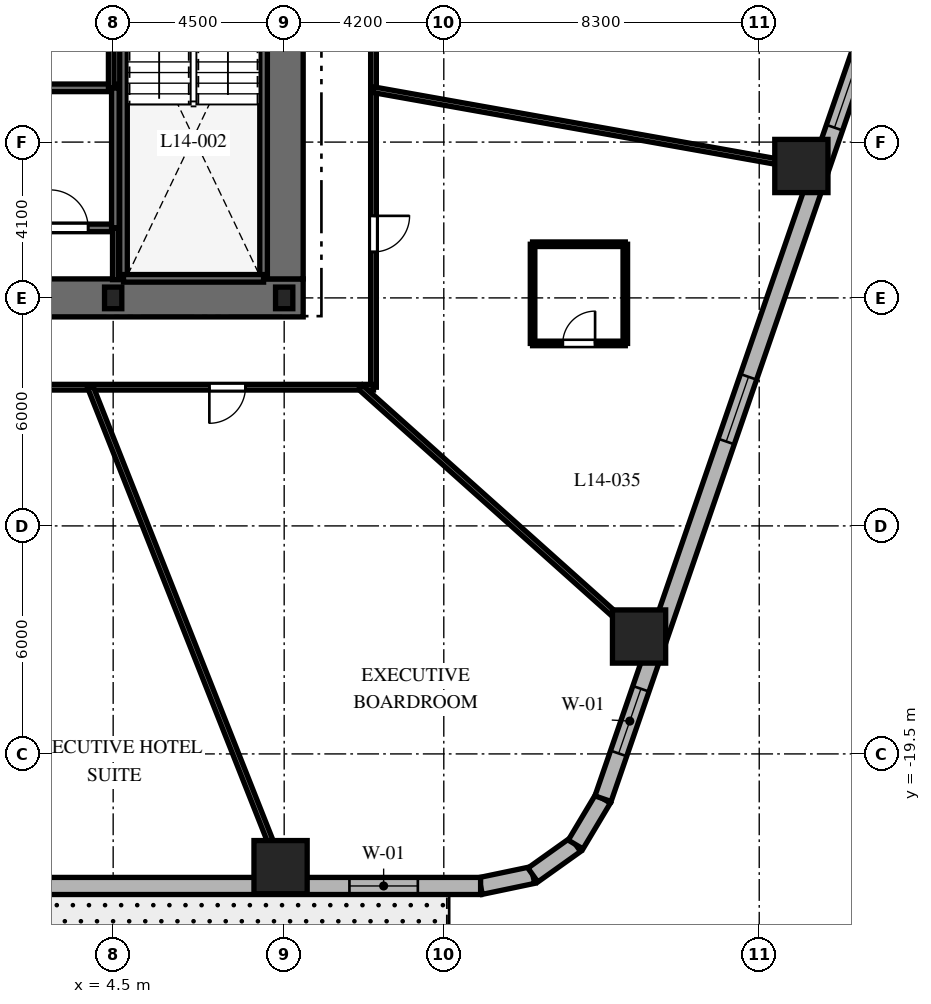
"""IFC4 building model, lengths in metres.
Left out: names, types, materials, properties, quantities, classifications, styles, units other than length and angle.
Written with IfcOpenShell. Run it as: python <this file> out.ifc"""

import sys

from ifc_helpers import new_model, si_unit, direction, frame, frame_2d, origin, origin_2d, place, context, subcontext, project, spatial, rectangle, i_section, extrude, element, fill, save


model = new_model("IFC4")
c1 = context("Model", 3, precision=1e-05, world=origin(), true_north=direction((0.0, 1.0)))
c2 = subcontext(c1, "Body", "Model", "MODEL_VIEW")
j1 = project(units=[si_unit("LENGTHUNIT", "METRE"), si_unit("PLANEANGLEUNIT", "RADIAN")], contexts=[c1])
p1 = place(None, origin())
s1 = spatial("IfcSite", under=j1, at=p1, CompositionType="ELEMENT")
p2 = place(p1, origin())
s2 = spatial("IfcBuilding", under=s1, at=p2, CompositionType="ELEMENT")
p3 = place(p2, frame((0.0, 0.0, 63.8)))
s3 = spatial("IfcBuildingStorey", under=s2, at=p3, CompositionType="ELEMENT", Elevation=63.8)
p4 = place(p3, frame((-9.5, -7.5, 0.0), z_axis=(0.0, 0.0, 1.0), x_axis=(1.0, 0.0, 0.0)))
e1 = element("IfcWall", 1, at=p4, inside=s3, PredefinedType="SHEAR", context=c2, shape_type="SweptSolid", body=[
    extrude(rectangle(XDim=19.0, YDim=1.0, at=frame_2d((9.5, 0.0))), origin(), (0.0, 0.0, 1.0), 3.7),
])
p5 = place(p4, frame((9.55, 0.0, 0.0)))
e2 = element("IfcOpeningElement", 2, at=p5, cuts=e1, PredefinedType="OPENING", context=c2, shape_type="SweptSolid", body=[
    extrude(rectangle(XDim=1.0, YDim=2.15, at=frame_2d((0.5, 1.075))), frame((0.0, 0.51, 0.0), z_axis=(0.0, -1.0, 0.0), x_axis=(1.0, 0.0, 0.0)), (0.0, 0.0, 1.0), 1.02),
])
p6 = place(p3, frame((9.0, -7.0, 0.0), z_axis=(0.0, 0.0, 1.0), x_axis=(0.0, 1.0, 0.0)))
e3 = element("IfcWall", 3, at=p6, inside=s3, PredefinedType="SHEAR", context=c2, shape_type="SweptSolid", body=[
    extrude(rectangle(XDim=14.0, YDim=1.0, at=frame_2d((7.0, 0.0))), origin(), (0.0, 0.0, 1.0), 3.7),
])
p7 = place(p6, frame((10.125, 0.0, 0.0)))
e4 = element("IfcOpeningElement", 4, at=p7, cuts=e3, PredefinedType="OPENING", context=c2, shape_type="SweptSolid", body=[
    extrude(rectangle(XDim=1.05, YDim=2.15, at=frame_2d((0.525, 1.075))), frame((0.0, 0.51, 0.0), z_axis=(0.0, -1.0, 0.0), x_axis=(1.0, 0.0, 0.0)), (0.0, 0.0, 1.0), 1.02),
])
for number, where, z_axis, x_axis in (
    (5, (4.772, -6.985, 0.0), (0.0, 0.0, 1.0), (0.0, 1.0, 0.0)),
    (6, (8.458, -6.985, 0.0), (0.0, 0.0, 1.0), (0.0, 1.0, 0.0)),
):
    element("IfcWall", number, at=place(p3, frame(where, z_axis=z_axis, x_axis=x_axis)), inside=s3, PredefinedType="SHEAR", context=c2, shape_type="SweptSolid", body=[
        extrude(rectangle(XDim=9.143, YDim=0.2, at=frame_2d((4.572, 0.0))), origin(), (0.0, 0.0, 1.0), 3.7),
    ])
p8 = place(p3, frame((4.772, -6.985, 0.0), z_axis=(0.0, 0.0, 1.0), x_axis=(1.0, 0.0, 0.0)))
e7 = element("IfcWall", 7, at=p8, inside=s3, PredefinedType="SHEAR", context=c2, shape_type="SweptSolid", body=[
    extrude(rectangle(XDim=3.686, YDim=0.2, at=frame_2d((1.843, 0.0))), origin(), (0.0, 0.0, 1.0), 3.7),
])
p9 = place(p3, frame((-4.608, -5.658, 0.0), z_axis=(0.0, 0.0, 1.0), x_axis=(1.0, 0.0, 0.0)))
e8 = element("IfcWall", 8, at=p9, inside=s3, PredefinedType="SHEAR", context=c2, shape_type="SweptSolid", body=[
    extrude(rectangle(XDim=9.166, YDim=0.2, at=frame_2d((4.583, 0.0))), origin(), (0.0, 0.0, 1.0), 3.7),
])
p10 = place(p9, frame((7.45, 0.0, 0.0)))
e9 = element("IfcOpeningElement", 9, at=p10, cuts=e8, PredefinedType="OPENING", context=c2, shape_type="SweptSolid", body=[
    extrude(rectangle(XDim=1.0, YDim=2.15, at=frame_2d((0.5, 1.075))), frame((0.0, 0.11, 0.0), z_axis=(0.0, -1.0, 0.0), x_axis=(1.0, 0.0, 0.0)), (0.0, 0.0, 1.0), 0.22),
])
p11 = place(p3, frame((-4.608, -1.972, 0.0), z_axis=(0.0, 0.0, 1.0), x_axis=(1.0, 0.0, 0.0)))
e10 = element("IfcWall", 10, at=p11, inside=s3, PredefinedType="SHEAR", context=c2, shape_type="SweptSolid", body=[
    extrude(rectangle(XDim=9.166, YDim=0.2, at=frame_2d((4.583, 0.0))), origin(), (0.0, 0.0, 1.0), 3.7),
])
p12 = place(p3, frame((4.558, -5.658, 0.0), z_axis=(0.0, 0.0, 1.0), x_axis=(0.0, 1.0, 0.0)))
e11 = element("IfcWall", 11, at=p12, inside=s3, PredefinedType="SHEAR", context=c2, shape_type="SweptSolid", body=[
    extrude(rectangle(XDim=3.686, YDim=0.2, at=frame_2d((1.843, 0.0))), origin(), (0.0, 0.0, 1.0), 3.7),
])
for number, where, z_axis, x_axis in (
    (12, (4.5, -7.5, 0.0), (0.0, 0.0, 1.0), (1.0, 0.0, 0.0)),
    (13, (9.0, -7.5, 0.0), (0.0, 0.0, 1.0), (1.0, 0.0, 0.0)),
):
    element("IfcColumn", number, at=place(p3, frame(where, z_axis=z_axis, x_axis=x_axis)), inside=s3, PredefinedType="COLUMN", context=c2, shape_type="SweptSolid", body=[
        extrude(i_section(OverallWidth=0.454, OverallDepth=0.569, WebThickness=0.078, FlangeThickness=0.125, at=origin_2d()), origin(), (0.0, 0.0, 1.0), 3.7),
    ])
for number, where, z_axis, x_axis in (
    (14, (8.905, -22.48, 0.0), (0.0, 0.0, 1.0), (1.0, 0.0, 0.0)),
    (15, (18.338, -16.411, 0.0), (0.0, 0.0, 1.0), (1.0, 0.0, 0.0)),
    (16, (22.609, -4.029, 0.0), (0.0, 0.0, 1.0), (1.0, 0.0, 0.0)),
):
    element("IfcColumn", number, at=place(p3, frame(where, z_axis=z_axis, x_axis=x_axis)), inside=s3, PredefinedType="COLUMN", context=c2, shape_type="SweptSolid", body=[
        extrude(rectangle(XDim=1.4, YDim=1.4, at=origin_2d()), origin(), (0.0, 0.0, 1.0), 3.7),
    ])
p13 = place(p3, frame((14.168, -22.975, 0.0), z_axis=(0.0, 0.0, 1.0), x_axis=(0.978770371074, 0.204959900243, 0.0)))
e17 = element("IfcWall", 17, at=p13, inside=s3, PredefinedType="SOLIDWALL", context=c2, shape_type="SweptSolid", body=[
    extrude(rectangle(XDim=1.406, YDim=0.45, at=frame_2d((0.703, 0.0))), origin(), (0.0, 0.0, 1.0), 3.4),
])
p14 = place(p3, frame((15.544, -22.687, 0.0), z_axis=(0.0, 0.0, 1.0), x_axis=(0.814210854316, 0.580569276412, 0.0)))
e18 = element("IfcWall", 18, at=p14, inside=s3, PredefinedType="SOLIDWALL", context=c2, shape_type="SweptSolid", body=[
    extrude(rectangle(XDim=1.381, YDim=0.45, at=frame_2d((0.691, 0.0))), origin(), (0.0, 0.0, 1.0), 3.4),
])
p15 = place(p3, frame((16.669, -21.885, 0.0), z_axis=(0.0, 0.0, 1.0), x_axis=(0.512936712947, 0.858426425799, 0.0)))
e19 = element("IfcWall", 19, at=p15, inside=s3, PredefinedType="SOLIDWALL", context=c2, shape_type="SweptSolid", body=[
    extrude(rectangle(XDim=1.406, YDim=0.45, at=frame_2d((0.703, 0.0))), origin(), (0.0, 0.0, 1.0), 3.4),
])
p16 = place(p3, frame((-12.221, -22.975, 0.0), z_axis=(0.0, 0.0, 1.0), x_axis=(1.0, 0.0, 0.0)))
e20 = element("IfcWall", 20, at=p16, inside=s3, PredefinedType="SOLIDWALL", context=c2, shape_type="SweptSolid", body=[
    extrude(rectangle(XDim=26.389, YDim=0.45, at=frame_2d((13.195, 0.0))), origin(), (0.0, 0.0, 1.0), 3.4),
])
p17 = place(p16, frame((2.799, 0.0, 0.0)))
e21 = element("IfcOpeningElement", 21, at=p17, cuts=e20, PredefinedType="OPENING", context=c2, shape_type="SweptSolid", body=[
    extrude(rectangle(XDim=1.0, YDim=2.15, at=frame_2d((0.5, 1.075))), frame((0.0, 0.235, 0.0), z_axis=(0.0, -1.0, 0.0), x_axis=(1.0, 0.0, 0.0)), (0.0, 0.0, 1.0), 0.47),
])
p18 = place(p16, frame((12.296, 0.0, 0.8)))
e22 = element("IfcOpeningElement", 22, at=p18, cuts=e20, PredefinedType="OPENING", context=c2, shape_type="SweptSolid", body=[
    extrude(rectangle(XDim=1.8, YDim=1.8, at=frame_2d((0.9, 0.9))), frame((0.0, 0.235, 0.0), z_axis=(0.0, -1.0, 0.0), x_axis=(1.0, 0.0, 0.0)), (0.0, 0.0, 1.0), 0.47),
])
p19 = place(p16, frame((22.938, 0.0, 0.8)))
e23 = element("IfcOpeningElement", 23, at=p19, cuts=e20, PredefinedType="OPENING", context=c2, shape_type="SweptSolid", body=[
    extrude(rectangle(XDim=1.8, YDim=1.8, at=frame_2d((0.9, 0.9))), frame((0.0, 0.235, 0.0), z_axis=(0.0, -1.0, 0.0), x_axis=(1.0, 0.0, 0.0)), (0.0, 0.0, 1.0), 0.47),
])
p20 = place(p3, frame((17.39, -20.678, 0.0), z_axis=(0.0, 0.0, 1.0), x_axis=(0.326068018294, 0.945346310854, 0.0)))
e24 = element("IfcWall", 24, at=p20, inside=s3, PredefinedType="SOLIDWALL", context=c2, shape_type="SweptSolid", body=[
    extrude(rectangle(XDim=21.793, YDim=0.45, at=frame_2d((10.896, 0.0))), origin(), (0.0, 0.0, 1.0), 3.4),
])
p21 = place(p20, frame((1.26, 0.0, 0.8)))
e25 = element("IfcOpeningElement", 25, at=p21, cuts=e24, PredefinedType="OPENING", context=c2, shape_type="SweptSolid", body=[
    extrude(rectangle(XDim=1.8, YDim=1.8, at=frame_2d((0.9, 0.9))), frame((0.0, 0.235, 0.0), z_axis=(0.0, -1.0, 0.0), x_axis=(1.0, 0.0, 0.0)), (0.0, 0.0, 1.0), 0.47),
])
p22 = place(p20, frame((9.943, 0.0, 0.8)))
e26 = element("IfcOpeningElement", 26, at=p22, cuts=e24, PredefinedType="OPENING", context=c2, shape_type="SweptSolid", body=[
    extrude(rectangle(XDim=1.8, YDim=1.8, at=frame_2d((0.9, 0.9))), frame((0.0, 0.235, 0.0), z_axis=(0.0, -1.0, 0.0), x_axis=(1.0, 0.0, 0.0)), (0.0, 0.0, 1.0), 0.47),
])
p23 = place(p20, frame((18.68, 0.0, 0.8)))
e27 = element("IfcOpeningElement", 27, at=p23, cuts=e24, PredefinedType="OPENING", context=c2, shape_type="SweptSolid", body=[
    extrude(rectangle(XDim=1.8, YDim=1.8, at=frame_2d((0.9, 0.9))), frame((0.0, 0.235, 0.0), z_axis=(0.0, -1.0, 0.0), x_axis=(1.0, 0.0, 0.0)), (0.0, 0.0, 1.0), 0.47),
])
p24 = place(p3, frame((4.558, -7.02, 0.0), z_axis=(0.0, 0.0, 1.0), x_axis=(0.0, 1.0, 0.0)))
e28 = element("IfcWall", 28, at=p24, inside=s3, PredefinedType="PARTITIONING", context=c2, shape_type="SweptSolid", body=[
    extrude(rectangle(XDim=1.362, YDim=0.15, at=frame_2d((0.681, 0.0))), origin(), (0.0, 0.0, 1.0), 3.4),
])
p25 = place(p3, frame((4.45, -1.972, 0.0), z_axis=(0.0, 0.0, 1.0), x_axis=(0.0, 1.0, 0.0)))
e29 = element("IfcWall", 29, at=p25, inside=s3, PredefinedType="PARTITIONING", context=c2, shape_type="SweptSolid", body=[
    extrude(rectangle(XDim=4.222, YDim=0.15, at=frame_2d((2.111, 0.0))), origin(), (0.0, 0.0, 1.0), 3.4),
])
p26 = place(p3, frame((11.35, 9.85, 0.0), z_axis=(0.0, 0.0, 1.0), x_axis=(0.0, -1.0, 0.0)))
e30 = element("IfcWall", 30, at=p26, inside=s3, PredefinedType="PARTITIONING", context=c2, shape_type="SweptSolid", body=[
    extrude(rectangle(XDim=19.7, YDim=0.15, at=frame_2d((9.85, 0.0))), origin(), (0.0, 0.0, 1.0), 2.84),
])
p27 = place(p26, frame((4.704, 0.0, 0.0)))
e31 = element("IfcOpeningElement", 31, at=p27, cuts=e30, PredefinedType="OPENING", context=c2, shape_type="SweptSolid", body=[
    extrude(rectangle(XDim=0.95, YDim=2.03, at=frame_2d((0.475, 1.015))), frame((0.0, 0.085, 0.0), z_axis=(0.0, -1.0, 0.0), x_axis=(1.0, 0.0, 0.0)), (0.0, 0.0, 1.0), 0.17),
])
p28 = place(p26, frame((1.462, 0.0, 0.0)))
e32 = element("IfcOpeningElement", 32, at=p28, cuts=e30, PredefinedType="OPENING", context=c2, shape_type="SweptSolid", body=[
    extrude(rectangle(XDim=0.95, YDim=2.03, at=frame_2d((0.475, 1.015))), frame((0.0, 0.085, 0.0), z_axis=(0.0, -1.0, 0.0), x_axis=(1.0, 0.0, 0.0)), (0.0, 0.0, 1.0), 0.17),
])
p29 = place(p26, frame((15.191, 0.0, 0.0)))
e33 = element("IfcOpeningElement", 33, at=p29, cuts=e30, PredefinedType="OPENING", context=c2, shape_type="SweptSolid", body=[
    extrude(rectangle(XDim=0.95, YDim=2.03, at=frame_2d((0.475, 1.015))), frame((0.0, 0.085, 0.0), z_axis=(0.0, -1.0, 0.0), x_axis=(1.0, 0.0, 0.0)), (0.0, 0.0, 1.0), 0.17),
])
p30 = place(p26, frame((8.838, 0.0, 0.0)))
e34 = element("IfcOpeningElement", 34, at=p30, cuts=e30, PredefinedType="OPENING", context=c2, shape_type="SweptSolid", body=[
    extrude(rectangle(XDim=0.95, YDim=2.03, at=frame_2d((0.475, 1.015))), frame((0.0, 0.085, 0.0), z_axis=(0.0, -1.0, 0.0), x_axis=(1.0, 0.0, 0.0)), (0.0, 0.0, 1.0), 0.17),
])
p31 = place(p3, frame((11.35, -9.85, 0.0), z_axis=(0.0, 0.0, 1.0), x_axis=(-1.0, 0.0, 0.0)))
e35 = element("IfcWall", 35, at=p31, inside=s3, PredefinedType="PARTITIONING", context=c2, shape_type="SweptSolid", body=[
    extrude(rectangle(XDim=22.7, YDim=0.15, at=frame_2d((11.35, 0.0))), origin(), (0.0, 0.0, 1.0), 2.84),
])
p32 = place(p31, frame((17.225, 0.0, 0.0)))
e36 = element("IfcOpeningElement", 36, at=p32, cuts=e35, PredefinedType="OPENING", context=c2, shape_type="SweptSolid", body=[
    extrude(rectangle(XDim=0.95, YDim=2.03, at=frame_2d((0.475, 1.015))), frame((0.0, 0.085, 0.0), z_axis=(0.0, -1.0, 0.0), x_axis=(1.0, 0.0, 0.0)), (0.0, 0.0, 1.0), 0.17),
])
p33 = place(p31, frame((10.444, 0.0, 0.0)))
e37 = element("IfcOpeningElement", 37, at=p33, cuts=e35, PredefinedType="OPENING", context=c2, shape_type="SweptSolid", body=[
    extrude(rectangle(XDim=0.95, YDim=2.03, at=frame_2d((0.475, 1.015))), frame((0.0, 0.085, 0.0), z_axis=(0.0, -1.0, 0.0), x_axis=(1.0, 0.0, 0.0)), (0.0, 0.0, 1.0), 0.17),
])
p34 = place(p31, frame((3.369, 0.0, 0.0)))
e38 = element("IfcOpeningElement", 38, at=p34, cuts=e35, PredefinedType="OPENING", context=c2, shape_type="SweptSolid", body=[
    extrude(rectangle(XDim=0.95, YDim=2.03, at=frame_2d((0.475, 1.015))), frame((0.0, 0.085, 0.0), z_axis=(0.0, -1.0, 0.0), x_axis=(1.0, 0.0, 0.0)), (0.0, 0.0, 1.0), 0.17),
])
p35 = place(p3, frame((3.902, -9.85, 0.0), z_axis=(0.0, 0.0, 1.0), x_axis=(0.36828765711, -0.929711891728, 0.0)))
e39 = element("IfcWall", 39, at=p35, inside=s3, PredefinedType="PARTITIONING", context=c2, shape_type="SweptSolid", body=[
    extrude(rectangle(XDim=14.117, YDim=0.15, at=frame_2d((7.059, 0.0))), origin(), (0.0, 0.0, 1.0), 2.54),
])
p36 = place(p3, frame((11.007, -9.85, 0.0), z_axis=(0.0, 0.0, 1.0), x_axis=(0.745177305978, -0.666866390407, 0.0)))
e40 = element("IfcWall", 40, at=p36, inside=s3, PredefinedType="PARTITIONING", context=c2, shape_type="SweptSolid", body=[
    extrude(rectangle(XDim=10.375, YDim=0.15, at=frame_2d((5.188, 0.0))), origin(), (0.0, 0.0, 1.0), 2.54),
])
p37 = place(p3, frame((11.35, -2.023, 0.0), z_axis=(0.0, 0.0, 1.0), x_axis=(0.984493741877, -0.17541970301, 0.0)))
e41 = element("IfcWall", 41, at=p37, inside=s3, PredefinedType="PARTITIONING", context=c2, shape_type="SweptSolid", body=[
    extrude(rectangle(XDim=11.937, YDim=0.15, at=frame_2d((5.969, 0.0))), origin(), (0.0, 0.0, 1.0), 2.54),
])
p38 = place(p3, frame((15.536, -8.698, 0.0), z_axis=(0.0, 0.0, 1.0), x_axis=(1.0, 0.0, 0.0)))
e42 = element("IfcWall", 42, at=p38, inside=s3, PredefinedType="PARTITIONING", context=c2, shape_type="SweptSolid", body=[
    extrude(rectangle(XDim=2.44, YDim=0.12, at=frame_2d((1.22, 0.0))), origin(), (0.0, 0.0, 1.0), 2.972),
])
p39 = place(p38, frame((0.795, 0.0, 0.0)))
e43 = element("IfcOpeningElement", 43, at=p39, cuts=e42, PredefinedType="OPENING", context=c2, shape_type="SweptSolid", body=[
    extrude(rectangle(XDim=0.85, YDim=2.03, at=frame_2d((0.425, 1.015))), frame((0.0, 0.07, 0.0), z_axis=(0.0, -1.0, 0.0), x_axis=(1.0, 0.0, 0.0)), (0.0, 0.0, 1.0), 0.14),
])
p40 = place(p3, frame((17.976, -8.698, 0.0), z_axis=(0.0, 0.0, 1.0), x_axis=(0.0, 1.0, 0.0)))
e44 = element("IfcWall", 44, at=p40, inside=s3, PredefinedType="PARTITIONING", context=c2, shape_type="SweptSolid", body=[
    extrude(rectangle(XDim=2.61, YDim=0.12, at=frame_2d((1.305, 0.0))), origin(), (0.0, 0.0, 1.0), 2.972),
])
p41 = place(p3, frame((17.976, -6.088, 0.0), z_axis=(0.0, 0.0, 1.0), x_axis=(-1.0, 0.0, 0.0)))
e45 = element("IfcWall", 45, at=p41, inside=s3, PredefinedType="PARTITIONING", context=c2, shape_type="SweptSolid", body=[
    extrude(rectangle(XDim=2.44, YDim=0.12, at=frame_2d((1.22, 0.0))), origin(), (0.0, 0.0, 1.0), 2.972),
])
p42 = place(p3, frame((15.536, -6.088, 0.0), z_axis=(0.0, 0.0, 1.0), x_axis=(0.0, -1.0, 0.0)))
e46 = element("IfcWall", 46, at=p42, inside=s3, PredefinedType="PARTITIONING", context=c2, shape_type="SweptSolid", body=[
    extrude(rectangle(XDim=2.61, YDim=0.12, at=frame_2d((1.305, 0.0))), origin(), (0.0, 0.0, 1.0), 3.4),
])
p43 = place(p19, origin())
e47 = element("IfcWindow", 47, at=p43, inside=s3, PartitioningType="SINGLE_PANEL", PredefinedType="WINDOW", context=c2, shape_type="SweptSolid", body=[
    extrude(rectangle(XDim=1.8, YDim=1.8, at=frame_2d((0.9, 0.9))), frame((0.0, 0.03, 0.0), z_axis=(0.0, -1.0, 0.0), x_axis=(1.0, 0.0, 0.0)), (0.0, 0.0, 1.0), 0.06),
])
fill(e23, e47)
p44 = place(p21, origin())
e48 = element("IfcWindow", 48, at=p44, inside=s3, PartitioningType="SINGLE_PANEL", PredefinedType="WINDOW", context=c2, shape_type="SweptSolid", body=[
    extrude(rectangle(XDim=1.8, YDim=1.8, at=frame_2d((0.9, 0.9))), frame((0.0, 0.03, 0.0), z_axis=(0.0, -1.0, 0.0), x_axis=(1.0, 0.0, 0.0)), (0.0, 0.0, 1.0), 0.06),
])
fill(e25, e48)
p45 = place(p22, origin())
e49 = element("IfcWindow", 49, at=p45, inside=s3, PartitioningType="SINGLE_PANEL", PredefinedType="WINDOW", context=c2, shape_type="SweptSolid", body=[
    extrude(rectangle(XDim=1.8, YDim=1.8, at=frame_2d((0.9, 0.9))), frame((0.0, 0.03, 0.0), z_axis=(0.0, -1.0, 0.0), x_axis=(1.0, 0.0, 0.0)), (0.0, 0.0, 1.0), 0.06),
])
fill(e26, e49)
p46 = place(p23, origin())
e50 = element("IfcWindow", 50, at=p46, inside=s3, PartitioningType="SINGLE_PANEL", PredefinedType="WINDOW", context=c2, shape_type="SweptSolid", body=[
    extrude(rectangle(XDim=1.8, YDim=1.8, at=frame_2d((0.9, 0.9))), frame((0.0, 0.03, 0.0), z_axis=(0.0, -1.0, 0.0), x_axis=(1.0, 0.0, 0.0)), (0.0, 0.0, 1.0), 0.06),
])
fill(e27, e50)
p47 = place(p10, origin())
e51 = element("IfcDoor", 51, at=p47, inside=s3, OperationType="SINGLE_SWING_LEFT", PredefinedType="DOOR", context=c2, shape_type="SweptSolid", body=[
    extrude(rectangle(XDim=1.0, YDim=2.15, at=frame_2d((0.5, 1.075))), frame((0.0, 0.025, 0.0), z_axis=(0.0, -1.0, 0.0), x_axis=(1.0, 0.0, 0.0)), (0.0, 0.0, 1.0), 0.05),
])
fill(e9, e51)
p48 = place(p34, origin())
e52 = element("IfcDoor", 52, at=p48, inside=s3, OperationType="SINGLE_SWING_RIGHT", PredefinedType="DOOR", context=c2, shape_type="SweptSolid", body=[
    extrude(rectangle(XDim=0.95, YDim=2.03, at=frame_2d((0.475, 1.015))), frame((0.0, 0.025, 0.0), z_axis=(0.0, -1.0, 0.0), x_axis=(1.0, 0.0, 0.0)), (0.0, 0.0, 1.0), 0.05),
])
fill(e38, e52)
p49 = place(p29, origin())
e53 = element("IfcDoor", 53, at=p49, inside=s3, OperationType="SINGLE_SWING_LEFT", PredefinedType="DOOR", context=c2, shape_type="SweptSolid", body=[
    extrude(rectangle(XDim=0.95, YDim=2.03, at=frame_2d((0.475, 1.015))), frame((0.0, 0.025, 0.0), z_axis=(0.0, -1.0, 0.0), x_axis=(1.0, 0.0, 0.0)), (0.0, 0.0, 1.0), 0.05),
])
fill(e33, e53)
p50 = place(p39, origin())
e54 = element("IfcDoor", 54, at=p50, inside=s3, OperationType="SINGLE_SWING_RIGHT", PredefinedType="DOOR", context=c2, shape_type="SweptSolid", body=[
    extrude(rectangle(XDim=0.85, YDim=2.03, at=frame_2d((0.425, 1.015))), frame((0.0, 0.025, 0.0), z_axis=(0.0, -1.0, 0.0), x_axis=(1.0, 0.0, 0.0)), (0.0, 0.0, 1.0), 0.05),
])
fill(e43, e54)
save(model, sys.argv[1])
